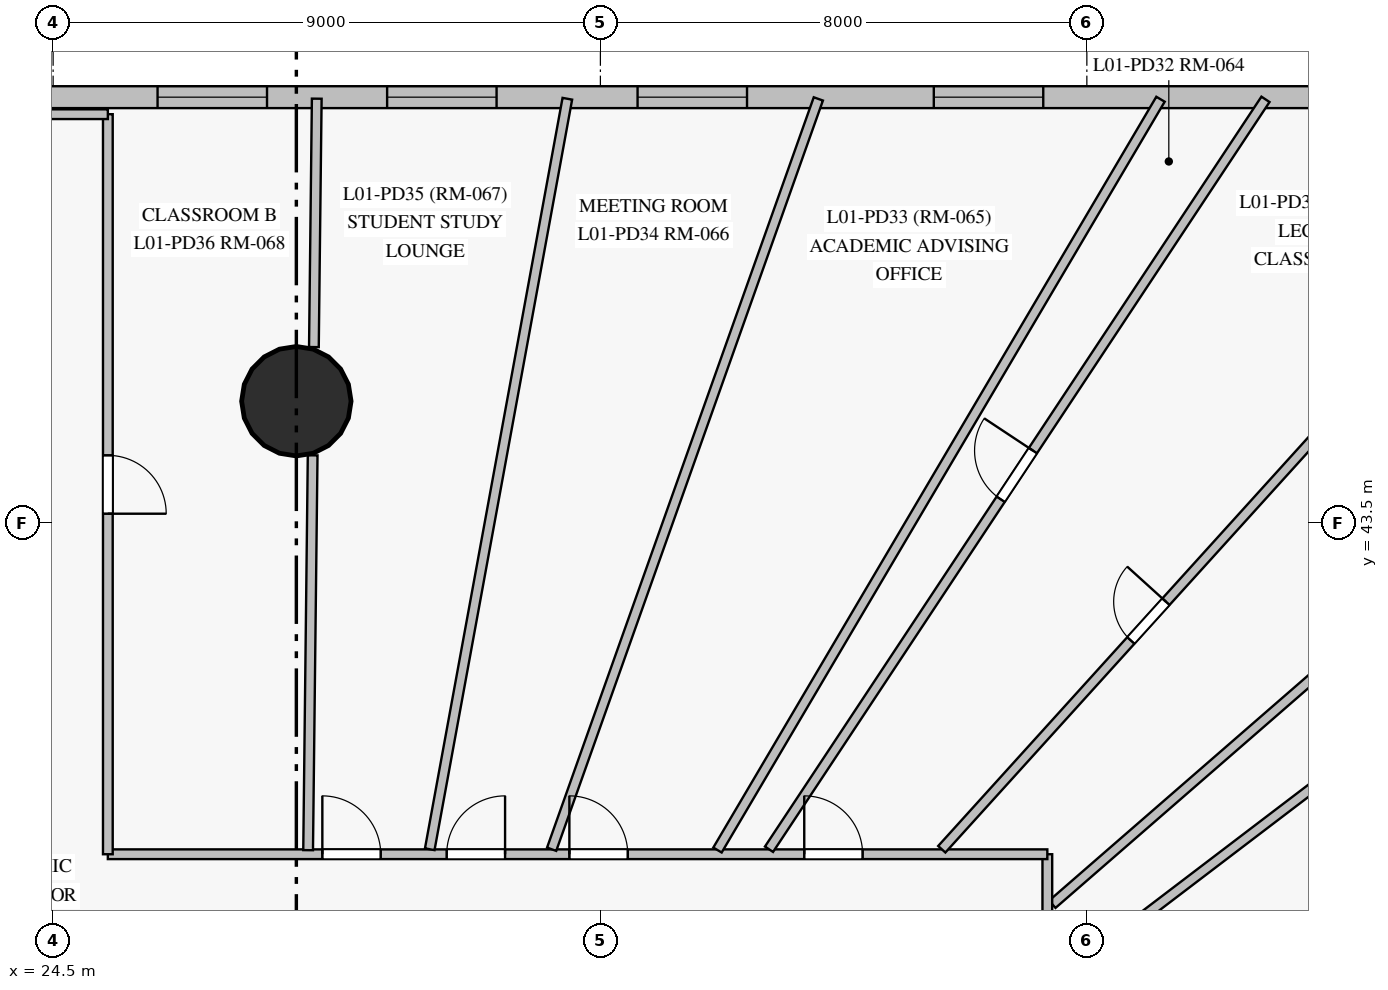
"""IFC4 building model, lengths in metres.
Left out: names, types, materials, properties, quantities, classifications, styles, units other than length and angle.
Written with IfcOpenShell. Run it as: python <this file> out.ifc"""

import sys

from ifc_helpers import new_model, si_unit, direction, frame, frame_2d, origin, origin_with_axes, origin_2d, place, context, subcontext, project, spatial, rectangle, circle, extrude, source, transform, mapped, element, fill, save


model = new_model("IFC4")
c1 = context("Model", 3, precision=1e-05, world=origin(), true_north=direction((0.0, 1.0)))
c2 = subcontext(c1, "Body", "Model", "MODEL_VIEW")
j1 = project(units=[si_unit("LENGTHUNIT", "METRE"), si_unit("PLANEANGLEUNIT", "RADIAN")], contexts=[c1])
p1 = place(None, origin())
s1 = spatial("IfcSite", under=j1, at=p1, CompositionType="ELEMENT")
p2 = place(p1, origin())
s2 = spatial("IfcBuilding", under=s1, at=p2, CompositionType="ELEMENT")
p3 = place(p2, frame((0.0, 0.0, 4.5)))
s3 = spatial("IfcBuildingStorey", under=s2, at=p3, CompositionType="ELEMENT", Elevation=4.5)
m1 = source(origin_with_axes(), c2, "Body", "SweptSolid", [
    extrude(circle(Radius=0.9, at=origin_2d()), origin(), (0.0, 0.0, 1.0), 4.5),
])
p4 = place(p3, frame((28.5, 45.5, 0.0), z_axis=(0.0, 0.0, 1.0), x_axis=(1.0, 0.0, 0.0)))
e1 = element("IfcColumn", 1, at=p4, inside=s3, PredefinedType="COLUMN", context=c2, shape_type="MappedRepresentation", body=[
    mapped(m1, transform((0.0, 0.0, 0.0), scale=1.0)),
])
p5 = place(p3, frame((55.3, 50.5, 0.0), z_axis=(0.0, 0.0, 1.0), x_axis=(-1.0, 0.0, 0.0)))
e2 = element("IfcWall", 2, at=p5, inside=s3, PredefinedType="SOLIDWALL", context=c2, shape_type="SweptSolid", body=[
    extrude(rectangle(XDim=51.85, YDim=0.36, at=frame_2d((25.925, 0.0))), origin(), (0.0, 0.0, 1.0), 4.2),
])
p6 = place(p5, frame((1.739, 0.0, 0.85)))
e3 = element("IfcOpeningElement", 3, at=p6, cuts=e2, PredefinedType="OPENING", context=c2, shape_type="SweptSolid", body=[
    extrude(rectangle(XDim=1.8, YDim=2.2, at=frame_2d((0.9, 1.1))), frame((0.0, 0.19, 0.0), z_axis=(0.0, -1.0, 0.0), x_axis=(1.0, 0.0, 0.0)), (0.0, 0.0, 1.0), 0.38),
])
p7 = place(p5, frame((7.064, 0.0, 0.85)))
e4 = element("IfcOpeningElement", 4, at=p7, cuts=e2, PredefinedType="OPENING", context=c2, shape_type="SweptSolid", body=[
    extrude(rectangle(XDim=1.8, YDim=2.2, at=frame_2d((0.9, 1.1))), frame((0.0, 0.19, 0.0), z_axis=(0.0, -1.0, 0.0), x_axis=(1.0, 0.0, 0.0)), (0.0, 0.0, 1.0), 0.38),
])
p8 = place(p5, frame((14.517, 0.0, 0.85)))
e5 = element("IfcOpeningElement", 5, at=p8, cuts=e2, PredefinedType="OPENING", context=c2, shape_type="SweptSolid", body=[
    extrude(rectangle(XDim=1.8, YDim=2.2, at=frame_2d((0.9, 1.1))), frame((0.0, 0.19, 0.0), z_axis=(0.0, -1.0, 0.0), x_axis=(1.0, 0.0, 0.0)), (0.0, 0.0, 1.0), 0.38),
])
p9 = place(p5, frame((19.389, 0.0, 0.85)))
e6 = element("IfcOpeningElement", 6, at=p9, cuts=e2, PredefinedType="OPENING", context=c2, shape_type="SweptSolid", body=[
    extrude(rectangle(XDim=1.8, YDim=2.2, at=frame_2d((0.9, 1.1))), frame((0.0, 0.19, 0.0), z_axis=(0.0, -1.0, 0.0), x_axis=(1.0, 0.0, 0.0)), (0.0, 0.0, 1.0), 0.38),
])
p10 = place(p5, frame((23.507, 0.0, 0.85)))
e7 = element("IfcOpeningElement", 7, at=p10, cuts=e2, PredefinedType="OPENING", context=c2, shape_type="SweptSolid", body=[
    extrude(rectangle(XDim=1.8, YDim=2.2, at=frame_2d((0.9, 1.1))), frame((0.0, 0.19, 0.0), z_axis=(0.0, -1.0, 0.0), x_axis=(1.0, 0.0, 0.0)), (0.0, 0.0, 1.0), 0.38),
])
p11 = place(p5, frame((27.282, 0.0, 0.85)))
e8 = element("IfcOpeningElement", 8, at=p11, cuts=e2, PredefinedType="OPENING", context=c2, shape_type="SweptSolid", body=[
    extrude(rectangle(XDim=1.8, YDim=2.2, at=frame_2d((0.9, 1.1))), frame((0.0, 0.19, 0.0), z_axis=(0.0, -1.0, 0.0), x_axis=(1.0, 0.0, 0.0)), (0.0, 0.0, 1.0), 0.38),
])
p12 = place(p5, frame((31.1, 0.0, 0.85)))
e9 = element("IfcOpeningElement", 9, at=p12, cuts=e2, PredefinedType="OPENING", context=c2, shape_type="SweptSolid", body=[
    extrude(rectangle(XDim=1.8, YDim=2.2, at=frame_2d((0.9, 1.1))), frame((0.0, 0.19, 0.0), z_axis=(0.0, -1.0, 0.0), x_axis=(1.0, 0.0, 0.0)), (0.0, 0.0, 1.0), 0.38),
])
p13 = place(p5, frame((35.392, 0.0, 0.85)))
e10 = element("IfcOpeningElement", 10, at=p13, cuts=e2, PredefinedType="OPENING", context=c2, shape_type="SweptSolid", body=[
    extrude(rectangle(XDim=1.8, YDim=2.2, at=frame_2d((0.9, 1.1))), frame((0.0, 0.19, 0.0), z_axis=(0.0, -1.0, 0.0), x_axis=(1.0, 0.0, 0.0)), (0.0, 0.0, 1.0), 0.38),
])
p14 = place(p5, frame((42.797, 0.0, 0.85)))
e11 = element("IfcOpeningElement", 11, at=p14, cuts=e2, PredefinedType="OPENING", context=c2, shape_type="SweptSolid", body=[
    extrude(rectangle(XDim=1.8, YDim=2.2, at=frame_2d((0.9, 1.1))), frame((0.0, 0.19, 0.0), z_axis=(0.0, -1.0, 0.0), x_axis=(1.0, 0.0, 0.0)), (0.0, 0.0, 1.0), 0.38),
])
p15 = place(p5, frame((47.865, 0.0, 0.85)))
e12 = element("IfcOpeningElement", 12, at=p15, cuts=e2, PredefinedType="OPENING", context=c2, shape_type="SweptSolid", body=[
    extrude(rectangle(XDim=1.8, YDim=2.2, at=frame_2d((0.9, 1.1))), frame((0.0, 0.19, 0.0), z_axis=(0.0, -1.0, 0.0), x_axis=(1.0, 0.0, 0.0)), (0.0, 0.0, 1.0), 0.38),
])
p16 = place(p3, frame((40.932, 37.227, 0.0), z_axis=(0.0, 0.0, 1.0), x_axis=(0.754711343855, 0.656057000158, 0.0)))
e13 = element("IfcWall", 13, at=p16, inside=s3, PredefinedType="PARTITIONING", context=c2, shape_type="SweptSolid", body=[
    extrude(rectangle(XDim=19.568, YDim=0.16, at=frame_2d((9.784, 0.0))), origin(), (0.0, 0.0, 1.0), 4.2),
])
p17 = place(p16, frame((9.291, 0.0, 0.0)))
e14 = element("IfcOpeningElement", 14, at=p17, cuts=e13, PredefinedType="OPENING", context=c2, shape_type="SweptSolid", body=[
    extrude(rectangle(XDim=0.96, YDim=2.15, at=frame_2d((0.48, 1.075))), frame((0.0, 0.09, 0.0), z_axis=(0.0, -1.0, 0.0), x_axis=(1.0, 0.0, 0.0)), (0.0, 0.0, 1.0), 0.18),
])
p18 = place(p3, frame((40.932, 35.888, 0.0), z_axis=(0.0, 0.0, 1.0), x_axis=(0.795705622, 0.605683550311, 0.0)))
e15 = element("IfcWall", 15, at=p18, inside=s3, PredefinedType="PARTITIONING", context=c2, shape_type="SweptSolid", body=[
    extrude(rectangle(XDim=19.392, YDim=0.16, at=frame_2d((9.696, 0.0))), origin(), (0.0, 0.0, 1.0), 4.2),
])
p19 = place(p18, frame((9.203, 0.0, 0.0)))
e16 = element("IfcOpeningElement", 16, at=p19, cuts=e15, PredefinedType="OPENING", context=c2, shape_type="SweptSolid", body=[
    extrude(rectangle(XDim=0.96, YDim=2.15, at=frame_2d((0.48, 1.075))), frame((0.0, 0.09, 0.0), z_axis=(0.0, -1.0, 0.0), x_axis=(1.0, 0.0, 0.0)), (0.0, 0.0, 1.0), 0.18),
])
p20 = place(p3, frame((40.85, 38.05, 0.0), z_axis=(0.0, 0.0, 1.0), x_axis=(0.0, -1.0, 0.0)))
e17 = element("IfcWall", 17, at=p20, inside=s3, PredefinedType="PARTITIONING", context=c2, shape_type="SweptSolid", body=[
    extrude(rectangle(XDim=18.508, YDim=0.16, at=frame_2d((9.254, 0.0))), origin(), (0.0, 0.0, 1.0), 3.25),
])
p21 = place(p20, frame((13.28, 0.0, 0.0)))
e18 = element("IfcOpeningElement", 18, at=p21, cuts=e17, PredefinedType="OPENING", context=c2, shape_type="SweptSolid", body=[
    extrude(rectangle(XDim=0.96, YDim=2.15, at=frame_2d((0.48, 1.075))), frame((0.0, 0.09, 0.0), z_axis=(0.0, -1.0, 0.0), x_axis=(1.0, 0.0, 0.0)), (0.0, 0.0, 1.0), 0.18),
])
p22 = place(p20, frame((11.636, 0.0, 0.0)))
e19 = element("IfcOpeningElement", 19, at=p22, cuts=e17, PredefinedType="OPENING", context=c2, shape_type="SweptSolid", body=[
    extrude(rectangle(XDim=0.96, YDim=2.15, at=frame_2d((0.48, 1.075))), frame((0.0, 0.09, 0.0), z_axis=(0.0, -1.0, 0.0), x_axis=(1.0, 0.0, 0.0)), (0.0, 0.0, 1.0), 0.18),
])
p23 = place(p20, frame((8.835, 0.0, 0.0)))
e20 = element("IfcOpeningElement", 20, at=p23, cuts=e17, PredefinedType="OPENING", context=c2, shape_type="SweptSolid", body=[
    extrude(rectangle(XDim=0.96, YDim=2.15, at=frame_2d((0.48, 1.075))), frame((0.0, 0.09, 0.0), z_axis=(0.0, -1.0, 0.0), x_axis=(1.0, 0.0, 0.0)), (0.0, 0.0, 1.0), 0.18),
])
p24 = place(p20, frame((6.084, 0.0, 0.0)))
e21 = element("IfcOpeningElement", 21, at=p24, cuts=e17, PredefinedType="OPENING", context=c2, shape_type="SweptSolid", body=[
    extrude(rectangle(XDim=0.96, YDim=2.15, at=frame_2d((0.48, 1.075))), frame((0.0, 0.09, 0.0), z_axis=(0.0, -1.0, 0.0), x_axis=(1.0, 0.0, 0.0)), (0.0, 0.0, 1.0), 0.18),
])
p25 = place(p20, frame((7.2, 0.0, 0.0)))
e22 = element("IfcOpeningElement", 22, at=p25, cuts=e17, PredefinedType="OPENING", context=c2, shape_type="SweptSolid", body=[
    extrude(rectangle(XDim=0.96, YDim=2.15, at=frame_2d((0.48, 1.075))), frame((0.0, 0.09, 0.0), z_axis=(0.0, -1.0, 0.0), x_axis=(1.0, 0.0, 0.0)), (0.0, 0.0, 1.0), 0.18),
])
p26 = place(p20, frame((2.446, 0.0, 0.0)))
e23 = element("IfcOpeningElement", 23, at=p26, cuts=e17, PredefinedType="OPENING", context=c2, shape_type="SweptSolid", body=[
    extrude(rectangle(XDim=0.86, YDim=2.04, at=frame_2d((0.43, 1.02))), frame((0.0, 0.09, 0.0), z_axis=(0.0, -1.0, 0.0), x_axis=(1.0, 0.0, 0.0)), (0.0, 0.0, 1.0), 0.18),
])
p27 = place(p20, frame((1.037, 0.0, 0.0)))
e24 = element("IfcOpeningElement", 24, at=p27, cuts=e17, PredefinedType="OPENING", context=c2, shape_type="SweptSolid", body=[
    extrude(rectangle(XDim=0.86, YDim=2.04, at=frame_2d((0.43, 1.02))), frame((0.0, 0.09, 0.0), z_axis=(0.0, -1.0, 0.0), x_axis=(1.0, 0.0, 0.0)), (0.0, 0.0, 1.0), 0.18),
])
p28 = place(p3, frame((40.919, 34.208, 0.0), z_axis=(0.0, 0.0, 1.0), x_axis=(0.847469594602, 0.530843937731, 0.0)))
e25 = element("IfcWall", 25, at=p28, inside=s3, PredefinedType="PARTITIONING", context=c2, shape_type="SweptSolid", body=[
    extrude(rectangle(XDim=18.226, YDim=0.16, at=frame_2d((9.113, 0.0))), origin(), (0.0, 0.0, 1.0), 4.2),
])
p29 = place(p28, frame((8.613, 0.0, 0.0)))
e26 = element("IfcOpeningElement", 26, at=p29, cuts=e25, PredefinedType="OPENING", context=c2, shape_type="SweptSolid", body=[
    extrude(rectangle(XDim=0.96, YDim=2.15, at=frame_2d((0.48, 1.075))), frame((0.0, 0.09, 0.0), z_axis=(0.0, -1.0, 0.0), x_axis=(1.0, 0.0, 0.0)), (0.0, 0.0, 1.0), 0.18),
])
p30 = place(p3, frame((40.919, 33.032, 0.0), z_axis=(0.0, 0.0, 1.0), x_axis=(0.883043074969, 0.469291942984, 0.0)))
e27 = element("IfcWall", 27, at=p30, inside=s3, PredefinedType="PARTITIONING", context=c2, shape_type="SweptSolid", body=[
    extrude(rectangle(XDim=17.495, YDim=0.16, at=frame_2d((8.748, 0.0))), origin(), (0.0, 0.0, 1.0), 4.2),
])
p31 = place(p30, frame((8.317, 0.0, 0.0)))
e28 = element("IfcOpeningElement", 28, at=p31, cuts=e27, PredefinedType="OPENING", context=c2, shape_type="SweptSolid", body=[
    extrude(rectangle(XDim=0.86, YDim=2.04, at=frame_2d((0.43, 1.02))), frame((0.0, 0.09, 0.0), z_axis=(0.0, -1.0, 0.0), x_axis=(1.0, 0.0, 0.0)), (0.0, 0.0, 1.0), 0.18),
])
p32 = place(p3, frame((40.918, 32.192, 0.0), z_axis=(0.0, 0.0, 1.0), x_axis=(0.907224152949, 0.420647520265, 0.0)))
e29 = element("IfcWall", 29, at=p32, inside=s3, PredefinedType="PARTITIONING", context=c2, shape_type="SweptSolid", body=[
    extrude(rectangle(XDim=17.031, YDim=0.16, at=frame_2d((8.515, 0.0))), origin(), (0.0, 0.0, 1.0), 4.2),
])
p33 = place(p32, frame((8.015, 0.0, 0.0)))
e30 = element("IfcOpeningElement", 30, at=p33, cuts=e29, PredefinedType="OPENING", context=c2, shape_type="SweptSolid", body=[
    extrude(rectangle(XDim=0.96, YDim=2.15, at=frame_2d((0.48, 1.075))), frame((0.0, 0.09, 0.0), z_axis=(0.0, -1.0, 0.0), x_axis=(1.0, 0.0, 0.0)), (0.0, 0.0, 1.0), 0.18),
])
p34 = place(p3, frame((25.4, 38.05, 0.0), z_axis=(0.0, 0.0, 1.0), x_axis=(1.0, 0.0, 0.0)))
e31 = element("IfcWall", 31, at=p34, inside=s3, PredefinedType="PARTITIONING", context=c2, shape_type="SweptSolid", body=[
    extrude(rectangle(XDim=15.45, YDim=0.16, at=frame_2d((7.725, 0.0))), origin(), (0.0, 0.0, 1.0), 4.2),
])
p35 = place(p34, frame((11.452, 0.0, 0.0)))
e32 = element("IfcOpeningElement", 32, at=p35, cuts=e31, PredefinedType="OPENING", context=c2, shape_type="SweptSolid", body=[
    extrude(rectangle(XDim=0.96, YDim=2.15, at=frame_2d((0.48, 1.075))), frame((0.0, 0.09, 0.0), z_axis=(0.0, -1.0, 0.0), x_axis=(1.0, 0.0, 0.0)), (0.0, 0.0, 1.0), 0.18),
])
p36 = place(p34, frame((7.59, 0.0, 0.0)))
e33 = element("IfcOpeningElement", 33, at=p36, cuts=e31, PredefinedType="OPENING", context=c2, shape_type="SweptSolid", body=[
    extrude(rectangle(XDim=0.96, YDim=2.15, at=frame_2d((0.48, 1.075))), frame((0.0, 0.09, 0.0), z_axis=(0.0, -1.0, 0.0), x_axis=(1.0, 0.0, 0.0)), (0.0, 0.0, 1.0), 0.18),
])
p37 = place(p34, frame((5.573, 0.0, 0.0)))
e34 = element("IfcOpeningElement", 34, at=p37, cuts=e31, PredefinedType="OPENING", context=c2, shape_type="SweptSolid", body=[
    extrude(rectangle(XDim=0.96, YDim=2.15, at=frame_2d((0.48, 1.075))), frame((0.0, 0.09, 0.0), z_axis=(0.0, -1.0, 0.0), x_axis=(1.0, 0.0, 0.0)), (0.0, 0.0, 1.0), 0.18),
])
p38 = place(p34, frame((3.528, 0.0, 0.0)))
e35 = element("IfcOpeningElement", 35, at=p38, cuts=e31, PredefinedType="OPENING", context=c2, shape_type="SweptSolid", body=[
    extrude(rectangle(XDim=0.96, YDim=2.15, at=frame_2d((0.48, 1.075))), frame((0.0, 0.09, 0.0), z_axis=(0.0, -1.0, 0.0), x_axis=(1.0, 0.0, 0.0)), (0.0, 0.0, 1.0), 0.18),
])
p39 = place(p3, frame((36.273, 38.132, 0.0), z_axis=(0.0, 0.0, 1.0), x_axis=(0.552038412562, 0.833818679963, 0.0)))
e36 = element("IfcWall", 36, at=p39, inside=s3, PredefinedType="PARTITIONING", context=c2, shape_type="SweptSolid", body=[
    extrude(rectangle(XDim=14.79, YDim=0.16, at=frame_2d((7.395, 0.0))), origin(), (0.0, 0.0, 1.0), 4.2),
])
p40 = place(p39, frame((6.903, 0.0, 0.0)))
e37 = element("IfcOpeningElement", 37, at=p40, cuts=e36, PredefinedType="OPENING", context=c2, shape_type="SweptSolid", body=[
    extrude(rectangle(XDim=0.96, YDim=2.15, at=frame_2d((0.48, 1.075))), frame((0.0, 0.09, 0.0), z_axis=(0.0, -1.0, 0.0), x_axis=(1.0, 0.0, 0.0)), (0.0, 0.0, 1.0), 0.18),
])
p41 = place(p3, frame((35.426, 38.119, 0.0), z_axis=(0.0, 0.0, 1.0), x_axis=(0.508185874547, 0.861247419103, 0.0)))
e38 = element("IfcWall", 38, at=p41, inside=s3, PredefinedType="PARTITIONING", context=c2, shape_type="SweptSolid", body=[
    extrude(rectangle(XDim=14.336, YDim=0.16, at=frame_2d((7.168, 0.0))), origin(), (0.0, 0.0, 1.0), 4.2),
])
p42 = place(p3, frame((32.698, 38.132, 0.0), z_axis=(0.0, 0.0, 1.0), x_axis=(0.33492470538, 0.942244894773, 0.0)))
e39 = element("IfcWall", 39, at=p42, inside=s3, PredefinedType="PARTITIONING", context=c2, shape_type="SweptSolid", body=[
    extrude(rectangle(XDim=13.095, YDim=0.16, at=frame_2d((6.548, 0.0))), origin(), (0.0, 0.0, 1.0), 4.2),
])
p43 = place(p3, frame((30.694, 38.132, 0.0), z_axis=(0.0, 0.0, 1.0), x_axis=(0.180349203279, 0.983602645826, 0.0)))
e40 = element("IfcWall", 40, at=p43, inside=s3, PredefinedType="PARTITIONING", context=c2, shape_type="SweptSolid", body=[
    extrude(rectangle(XDim=12.548, YDim=0.16, at=frame_2d((6.274, 0.0))), origin(), (0.0, 0.0, 1.0), 4.2),
])
p44 = place(p3, frame((25.4, 50.22, 0.0), z_axis=(0.0, 0.0, 1.0), x_axis=(0.0, -1.0, 0.0)))
e41 = element("IfcWall", 41, at=p44, inside=s3, PredefinedType="PARTITIONING", context=c2, shape_type="SweptSolid", body=[
    extrude(rectangle(XDim=12.17, YDim=0.16, at=frame_2d((6.085, 0.0))), origin(), (0.0, 0.0, 1.0), 4.2),
])
p45 = place(p44, frame((5.61, 0.0, 0.0)))
e42 = element("IfcOpeningElement", 42, at=p45, cuts=e41, PredefinedType="OPENING", context=c2, shape_type="SweptSolid", body=[
    extrude(rectangle(XDim=0.96, YDim=2.15, at=frame_2d((0.48, 1.075))), frame((0.0, 0.09, 0.0), z_axis=(0.0, -1.0, 0.0), x_axis=(1.0, 0.0, 0.0)), (0.0, 0.0, 1.0), 0.18),
])
p46 = place(p3, frame((39.114, 38.132, 0.0), z_axis=(0.0, 0.0, 1.0), x_axis=(0.671237186901, 0.741242631613, 0.0)))
e43 = element("IfcWall", 43, at=p46, inside=s3, PredefinedType="PARTITIONING", context=c2, shape_type="SweptSolid", body=[
    extrude(rectangle(XDim=10.124, YDim=0.16, at=frame_2d((5.062, 0.0))), origin(), (0.0, 0.0, 1.0), 4.2),
])
p47 = place(p46, frame((4.632, 0.0, 0.0)))
e44 = element("IfcOpeningElement", 44, at=p47, cuts=e43, PredefinedType="OPENING", context=c2, shape_type="SweptSolid", body=[
    extrude(rectangle(XDim=0.86, YDim=2.04, at=frame_2d((0.43, 1.02))), frame((0.0, 0.09, 0.0), z_axis=(0.0, -1.0, 0.0), x_axis=(1.0, 0.0, 0.0)), (0.0, 0.0, 1.0), 0.18),
])
p48 = place(p3, frame((28.694, 38.117, 0.0), z_axis=(0.0, 0.0, 1.0), x_axis=(0.011467135897, 0.999934250236, 0.0)))
e45 = element("IfcWall", 45, at=p48, inside=s3, PredefinedType="PARTITIONING", context=c2, shape_type="SweptSolid", body=[
    extrude(rectangle(XDim=6.494, YDim=0.16, at=frame_2d((3.247, 0.0))), origin(), (0.0, 0.0, 1.0), 3.25),
])
p49 = place(p3, frame((21.2, 50.22, 0.0), z_axis=(0.0, 0.0, 1.0), x_axis=(1.0, 0.0, 0.0)))
e46 = element("IfcWall", 46, at=p49, inside=s3, PredefinedType="PARTITIONING", context=c2, shape_type="SweptSolid", body=[
    extrude(rectangle(XDim=4.2, YDim=0.16, at=frame_2d((2.1, 0.0))), origin(), (0.0, 0.0, 1.0), 4.2),
])
p50 = place(p3, frame((28.789, 46.39, 0.0), z_axis=(0.0, 0.0, 1.0), x_axis=(0.011473576876, 0.99993417635, 0.0)))
e47 = element("IfcWall", 47, at=p50, inside=s3, PredefinedType="PARTITIONING", context=c2, shape_type="SweptSolid", body=[
    extrude(rectangle(XDim=4.085, YDim=0.16, at=frame_2d((2.043, 0.0))), origin(), (0.0, 0.0, 1.0), 4.2),
])
m2 = source(origin_with_axes(), c2, "Body", "SweptSolid", [
    extrude(rectangle(XDim=1.8, YDim=2.2, at=frame_2d((0.9, 1.1))), frame((0.0, 0.03, 0.0), z_axis=(0.0, -1.0, 0.0), x_axis=(1.0, 0.0, 0.0)), (0.0, 0.0, 1.0), 0.06),
])
p51 = place(p8, origin())
e48 = element("IfcWindow", 48, at=p51, inside=s3, PartitioningType="SINGLE_PANEL", PredefinedType="WINDOW", context=c2, shape_type="MappedRepresentation", body=[
    mapped(m2, transform((0.0, 0.0, 0.0), scale=1.0)),
])
fill(e5, e48)
p52 = place(p9, origin())
e49 = element("IfcWindow", 49, at=p52, inside=s3, PartitioningType="SINGLE_PANEL", PredefinedType="WINDOW", context=c2, shape_type="MappedRepresentation", body=[
    mapped(m2, transform((0.0, 0.0, 0.0), scale=1.0)),
])
fill(e6, e49)
p53 = place(p10, origin())
e50 = element("IfcWindow", 50, at=p53, inside=s3, PartitioningType="SINGLE_PANEL", PredefinedType="WINDOW", context=c2, shape_type="MappedRepresentation", body=[
    mapped(m2, transform((0.0, 0.0, 0.0), scale=1.0)),
])
fill(e7, e50)
p54 = place(p11, origin())
e51 = element("IfcWindow", 51, at=p54, inside=s3, PartitioningType="SINGLE_PANEL", PredefinedType="WINDOW", context=c2, shape_type="MappedRepresentation", body=[
    mapped(m2, transform((0.0, 0.0, 0.0), scale=1.0)),
])
fill(e8, e51)
m3 = source(origin_with_axes(), c2, "Body", "SweptSolid", [
    extrude(rectangle(XDim=0.96, YDim=2.15, at=frame_2d((0.48, 1.075))), frame((0.0, 0.025, 0.0), z_axis=(0.0, -1.0, 0.0), x_axis=(1.0, 0.0, 0.0)), (0.0, 0.0, 1.0), 0.05),
])
p55 = place(p35, origin())
e52 = element("IfcDoor", 52, at=p55, inside=s3, OperationType="SINGLE_SWING_LEFT", PredefinedType="DOOR", context=c2, shape_type="MappedRepresentation", body=[
    mapped(m3, transform((0.0, 0.0, 0.0), scale=1.0)),
])
fill(e32, e52)
p56 = place(p40, origin())
e53 = element("IfcDoor", 53, at=p56, inside=s3, OperationType="SINGLE_SWING_RIGHT", PredefinedType="DOOR", context=c2, shape_type="MappedRepresentation", body=[
    mapped(m3, transform((0.0, 0.0, 0.0), scale=1.0)),
])
fill(e37, e53)
p57 = place(p36, origin())
e54 = element("IfcDoor", 54, at=p57, inside=s3, OperationType="SINGLE_SWING_LEFT", PredefinedType="DOOR", context=c2, shape_type="MappedRepresentation", body=[
    mapped(m3, transform((0.0, 0.0, 0.0), scale=1.0)),
])
fill(e33, e54)
p58 = place(p37, origin())
e55 = element("IfcDoor", 55, at=p58, inside=s3, OperationType="SINGLE_SWING_RIGHT", PredefinedType="DOOR", context=c2, shape_type="MappedRepresentation", body=[
    mapped(m3, transform((0.0, 0.0, 0.0), scale=1.0)),
])
fill(e34, e55)
p59 = place(p38, origin())
e56 = element("IfcDoor", 56, at=p59, inside=s3, OperationType="SINGLE_SWING_LEFT", PredefinedType="DOOR", context=c2, shape_type="MappedRepresentation", body=[
    mapped(m3, transform((0.0, 0.0, 0.0), scale=1.0)),
])
fill(e35, e56)
p60 = place(p45, origin())
e57 = element("IfcDoor", 57, at=p60, inside=s3, OperationType="SINGLE_SWING_RIGHT", PredefinedType="DOOR", context=c2, shape_type="MappedRepresentation", body=[
    mapped(m3, transform((0.0, 0.0, 0.0), scale=1.0)),
])
fill(e42, e57)
m4 = source(origin_with_axes(), c2, "Body", "SweptSolid", [
    extrude(rectangle(XDim=0.86, YDim=2.04, at=frame_2d((0.43, 1.02))), frame((0.0, 0.025, 0.0), z_axis=(0.0, -1.0, 0.0), x_axis=(1.0, 0.0, 0.0)), (0.0, 0.0, 1.0), 0.05),
])
p61 = place(p47, origin())
e58 = element("IfcDoor", 58, at=p61, inside=s3, OperationType="SINGLE_SWING_RIGHT", PredefinedType="DOOR", context=c2, shape_type="MappedRepresentation", body=[
    mapped(m4, transform((0.0, 0.0, 0.0), scale=1.0)),
])
fill(e44, e58)
save(model, sys.argv[1])
